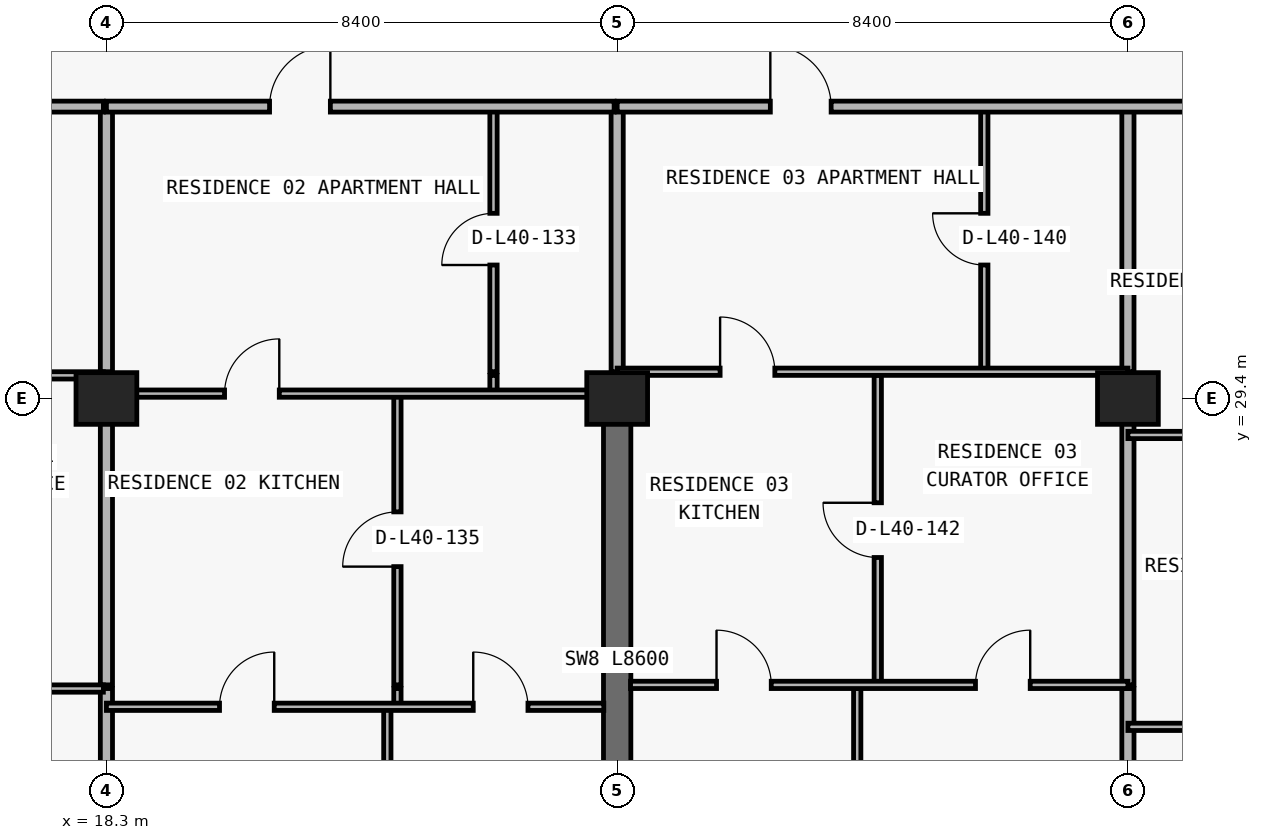
"""IFC4 building model, lengths in metres.
Left out: names, types, materials, properties, quantities, classifications, styles, units other than length and angle.
Written with IfcOpenShell. Run it as: python <this file> out.ifc"""

import sys

from ifc_helpers import new_model, si_unit, direction, frame, frame_2d, origin, origin_2d, place, context, subcontext, project, spatial, rectangle, extrude, element, fill, save


model = new_model("IFC4")
c1 = context("Model", 3, precision=1e-05, world=origin(), true_north=direction((0.0, 1.0)))
c2 = subcontext(c1, "Body", "Model", "MODEL_VIEW")
j1 = project(units=[si_unit("LENGTHUNIT", "METRE"), si_unit("PLANEANGLEUNIT", "RADIAN")], contexts=[c1])
p1 = place(None, origin())
s1 = spatial("IfcSite", under=j1, at=p1, CompositionType="ELEMENT")
p2 = place(p1, origin())
s2 = spatial("IfcBuilding", under=s1, at=p2, CompositionType="ELEMENT")
p3 = place(p2, frame((0.0, 0.0, 145.5)))
s3 = spatial("IfcBuildingStorey", under=s2, at=p3, CompositionType="ELEMENT", Elevation=145.5)
for number, where, z_axis, x_axis in (
    (1, (18.3, 29.4, 0.0), (0.0, 0.0, 1.0), (1.0, 0.0, 0.0)),
    (2, (26.7, 29.4, 0.0), (0.0, 0.0, 1.0), (1.0, 0.0, 0.0)),
    (3, (35.1, 29.4, 0.0), (0.0, 0.0, 1.0), (1.0, 0.0, 0.0)),
):
    element("IfcColumn", number, at=place(p3, frame(where, z_axis=z_axis, x_axis=x_axis)), inside=s3, PredefinedType="COLUMN", context=c2, shape_type="SweptSolid", body=[
        extrude(rectangle(XDim=1.0, YDim=0.85, at=origin_2d()), origin(), (0.0, 0.0, 1.0), 3.05),
    ])
p4 = place(p3, frame((26.7, 20.8, 0.0), z_axis=(0.0, 0.0, 1.0), x_axis=(0.0, 1.0, 0.0)))
e4 = element("IfcWall", 4, at=p4, inside=s3, PredefinedType="SHEAR", context=c2, shape_type="SweptSolid", body=[
    extrude(rectangle(XDim=8.6, YDim=0.45, at=frame_2d((4.3, 0.0))), origin(), (0.0, 0.0, 1.0), 3.05),
])
p5 = place(p3, frame((18.3, 8.84, 0.0), z_axis=(0.0, 0.0, 1.0), x_axis=(0.0, 1.0, 0.0)))
e5 = element("IfcWall", 5, at=p5, inside=s3, PredefinedType="PARTITIONING", context=c2, shape_type="SweptSolid", body=[
    extrude(rectangle(XDim=15.79, YDim=0.2, at=frame_2d((7.895, 0.0))), origin(), (0.0, 0.0, 1.0), 2.174),
])
p6 = place(p3, frame((18.3, 24.69, 0.0), z_axis=(0.0, 0.0, 1.0), x_axis=(0.0, 1.0, 0.0)))
e6 = element("IfcWall", 6, at=p6, inside=s3, PredefinedType="PARTITIONING", context=c2, shape_type="SweptSolid", body=[
    extrude(rectangle(XDim=5.09, YDim=0.2, at=frame_2d((2.545, 0.0))), origin(), (0.0, 0.0, 1.0), 2.174),
])
p7 = place(p3, frame((18.3, 29.84, 0.0), z_axis=(0.0, 0.0, 1.0), x_axis=(0.0, 1.0, 0.0)))
e7 = element("IfcWall", 7, at=p7, inside=s3, PredefinedType="PARTITIONING", context=c2, shape_type="SweptSolid", body=[
    extrude(rectangle(XDim=4.36, YDim=0.2, at=frame_2d((2.18, 0.0))), origin(), (0.0, 0.0, 1.0), 2.174),
])
p8 = place(p3, frame((22.92, 8.84, 0.0), z_axis=(0.0, 0.0, 1.0), x_axis=(0.0, 1.0, 0.0)))
e8 = element("IfcWall", 8, at=p8, inside=s3, PredefinedType="PARTITIONING", context=c2, shape_type="SweptSolid", body=[
    extrude(rectangle(XDim=15.49, YDim=0.12, at=frame_2d((7.745, 0.0))), origin(), (0.0, 0.0, 1.0), 3.05),
])
p9 = place(p3, frame((23.086, 24.335, 0.0), z_axis=(0.0, 0.0, 1.0), x_axis=(0.0, 1.0, 0.0)))
e9 = element("IfcWall", 9, at=p9, inside=s3, PredefinedType="PARTITIONING", context=c2, shape_type="SweptSolid", body=[
    extrude(rectangle(XDim=0.295, YDim=0.12, at=frame_2d((0.147, 0.0))), origin(), (0.0, 0.0, 1.0), 3.05),
])
p10 = place(p3, frame((23.086, 24.69, 0.0), z_axis=(0.0, 0.0, 1.0), x_axis=(0.0, 1.0, 0.0)))
e10 = element("IfcWall", 10, at=p10, inside=s3, PredefinedType="PARTITIONING", context=c2, shape_type="SweptSolid", body=[
    extrude(rectangle(XDim=4.79, YDim=0.12, at=frame_2d((2.395, 0.0))), origin(), (0.0, 0.0, 1.0), 3.05),
])
p11 = place(p10, frame((1.945, 0.0, 0.0)))
e11 = element("IfcOpeningElement", 11, at=p11, cuts=e10, PredefinedType="OPENING", context=c2, shape_type="SweptSolid", body=[
    extrude(rectangle(XDim=0.9, YDim=2.15, at=frame_2d((0.45, 1.075))), frame((0.0, 0.07, 0.0), z_axis=(0.0, -1.0, 0.0), x_axis=(1.0, 0.0, 0.0)), (0.0, 0.0, 1.0), 0.14),
])
p12 = place(p3, frame((24.666, 29.48, 0.0), z_axis=(0.0, 0.0, 1.0), x_axis=(0.0, 1.0, 0.0)))
e12 = element("IfcWall", 12, at=p12, inside=s3, PredefinedType="PARTITIONING", context=c2, shape_type="SweptSolid", body=[
    extrude(rectangle(XDim=0.3, YDim=0.12, at=frame_2d((0.15, 0.0))), origin(), (0.0, 0.0, 1.0), 3.05),
])
p13 = place(p3, frame((24.666, 29.84, 0.0), z_axis=(0.0, 0.0, 1.0), x_axis=(0.0, 1.0, 0.0)))
e13 = element("IfcWall", 13, at=p13, inside=s3, PredefinedType="PARTITIONING", context=c2, shape_type="SweptSolid", body=[
    extrude(rectangle(XDim=4.36, YDim=0.12, at=frame_2d((2.18, 0.0))), origin(), (0.0, 0.0, 1.0), 3.05),
])
p14 = place(p13, frame((1.755, 0.0, 0.0)))
e14 = element("IfcOpeningElement", 14, at=p14, cuts=e13, PredefinedType="OPENING", context=c2, shape_type="SweptSolid", body=[
    extrude(rectangle(XDim=0.85, YDim=2.1, at=frame_2d((0.425, 1.05))), frame((0.0, 0.07, 0.0), z_axis=(0.0, -1.0, 0.0), x_axis=(1.0, 0.0, 0.0)), (0.0, 0.0, 1.0), 0.14),
])
p15 = place(p3, frame((26.7, 29.405, 0.0), z_axis=(0.0, 0.0, 1.0), x_axis=(0.0, 1.0, 0.0)))
e15 = element("IfcWall", 15, at=p15, inside=s3, PredefinedType="PARTITIONING", context=c2, shape_type="SweptSolid", body=[
    extrude(rectangle(XDim=0.375, YDim=0.2, at=frame_2d((0.188, 0.0))), origin(), (0.0, 0.0, 1.0), 3.05),
])
p16 = place(p3, frame((26.7, 29.84, 0.0), z_axis=(0.0, 0.0, 1.0), x_axis=(0.0, 1.0, 0.0)))
e16 = element("IfcWall", 16, at=p16, inside=s3, PredefinedType="PARTITIONING", context=c2, shape_type="SweptSolid", body=[
    extrude(rectangle(XDim=4.36, YDim=0.2, at=frame_2d((2.18, 0.0))), origin(), (0.0, 0.0, 1.0), 2.335),
])
p17 = place(p3, frame((30.648, 8.84, 0.0), z_axis=(0.0, 0.0, 1.0), x_axis=(0.0, 1.0, 0.0)))
e17 = element("IfcWall", 17, at=p17, inside=s3, PredefinedType="PARTITIONING", context=c2, shape_type="SweptSolid", body=[
    extrude(rectangle(XDim=15.79, YDim=0.12, at=frame_2d((7.895, 0.0))), origin(), (0.0, 0.0, 1.0), 3.05),
])
p18 = place(p3, frame((30.986, 24.69, 0.0), z_axis=(0.0, 0.0, 1.0), x_axis=(0.0, 1.0, 0.0)))
e18 = element("IfcWall", 18, at=p18, inside=s3, PredefinedType="PARTITIONING", context=c2, shape_type="SweptSolid", body=[
    extrude(rectangle(XDim=5.09, YDim=0.12, at=frame_2d((2.545, 0.0))), origin(), (0.0, 0.0, 1.0), 2.725),
])
p19 = place(p18, frame((2.095, 0.0, 0.0)))
e19 = element("IfcOpeningElement", 19, at=p19, cuts=e18, PredefinedType="OPENING", context=c2, shape_type="SweptSolid", body=[
    extrude(rectangle(XDim=0.9, YDim=2.15, at=frame_2d((0.45, 1.075))), frame((0.0, 0.07, 0.0), z_axis=(0.0, -1.0, 0.0), x_axis=(1.0, 0.0, 0.0)), (0.0, 0.0, 1.0), 0.14),
])
p20 = place(p3, frame((32.738, 29.84, 0.0), z_axis=(0.0, 0.0, 1.0), x_axis=(0.0, 1.0, 0.0)))
e20 = element("IfcWall", 20, at=p20, inside=s3, PredefinedType="PARTITIONING", context=c2, shape_type="SweptSolid", body=[
    extrude(rectangle(XDim=4.36, YDim=0.12, at=frame_2d((2.18, 0.0))), origin(), (0.0, 0.0, 1.0), 3.05),
])
p21 = place(p20, frame((1.755, 0.0, 0.0)))
e21 = element("IfcOpeningElement", 21, at=p21, cuts=e20, PredefinedType="OPENING", context=c2, shape_type="SweptSolid", body=[
    extrude(rectangle(XDim=0.85, YDim=2.1, at=frame_2d((0.425, 1.05))), frame((0.0, 0.07, 0.0), z_axis=(0.0, -1.0, 0.0), x_axis=(1.0, 0.0, 0.0)), (0.0, 0.0, 1.0), 0.14),
])
p22 = place(p3, frame((35.1, 8.84, 0.0), z_axis=(0.0, 0.0, 1.0), x_axis=(0.0, 1.0, 0.0)))
e22 = element("IfcWall", 22, at=p22, inside=s3, PredefinedType="PARTITIONING", context=c2, shape_type="SweptSolid", body=[
    extrude(rectangle(XDim=15.79, YDim=0.2, at=frame_2d((7.895, 0.0))), origin(), (0.0, 0.0, 1.0), 2.174),
])
p23 = place(p3, frame((35.1, 24.69, 0.0), z_axis=(0.0, 0.0, 1.0), x_axis=(0.0, 1.0, 0.0)))
e23 = element("IfcWall", 23, at=p23, inside=s3, PredefinedType="PARTITIONING", context=c2, shape_type="SweptSolid", body=[
    extrude(rectangle(XDim=5.09, YDim=0.2, at=frame_2d((2.545, 0.0))), origin(), (0.0, 0.0, 1.0), 2.174),
])
p24 = place(p3, frame((35.1, 29.84, 0.0), z_axis=(0.0, 0.0, 1.0), x_axis=(0.0, 1.0, 0.0)))
e24 = element("IfcWall", 24, at=p24, inside=s3, PredefinedType="PARTITIONING", context=c2, shape_type="SweptSolid", body=[
    extrude(rectangle(XDim=4.36, YDim=0.2, at=frame_2d((2.18, 0.0))), origin(), (0.0, 0.0, 1.0), 2.174),
])
p25 = place(p3, frame((35.1, 24.0, 0.0), z_axis=(0.0, 0.0, 1.0), x_axis=(1.0, 0.0, 0.0)))
e25 = element("IfcWall", 25, at=p25, inside=s3, PredefinedType="PARTITIONING", context=c2, shape_type="SweptSolid", body=[
    extrude(rectangle(XDim=7.6, YDim=0.12, at=frame_2d((3.8, 0.0))), origin(), (0.0, 0.0, 1.0), 3.05),
])
p26 = place(p25, frame((3.35, 0.0, 0.0)))
e26 = element("IfcOpeningElement", 26, at=p26, cuts=e25, PredefinedType="OPENING", context=c2, shape_type="SweptSolid", body=[
    extrude(rectangle(XDim=0.9, YDim=2.15, at=frame_2d((0.45, 1.075))), frame((0.0, 0.07, 0.0), z_axis=(0.0, -1.0, 0.0), x_axis=(1.0, 0.0, 0.0)), (0.0, 0.0, 1.0), 0.14),
])
p27 = place(p3, frame((18.3, 24.33, 0.0), z_axis=(0.0, 0.0, 1.0), x_axis=(1.0, 0.0, 0.0)))
e27 = element("IfcWall", 27, at=p27, inside=s3, PredefinedType="PARTITIONING", context=c2, shape_type="SweptSolid", body=[
    extrude(rectangle(XDim=8.18, YDim=0.12, at=frame_2d((4.09, 0.0))), origin(), (0.0, 0.0, 1.0), 3.05),
])
p28 = place(p27, frame((1.86, 0.0, 0.0)))
e28 = element("IfcOpeningElement", 28, at=p28, cuts=e27, PredefinedType="OPENING", context=c2, shape_type="SweptSolid", body=[
    extrude(rectangle(XDim=0.9, YDim=2.15, at=frame_2d((0.45, 1.075))), frame((0.0, 0.07, 0.0), z_axis=(0.0, -1.0, 0.0), x_axis=(1.0, 0.0, 0.0)), (0.0, 0.0, 1.0), 0.14),
])
p29 = place(p27, frame((6.033, 0.0, 0.0)))
e29 = element("IfcOpeningElement", 29, at=p29, cuts=e27, PredefinedType="OPENING", context=c2, shape_type="SweptSolid", body=[
    extrude(rectangle(XDim=0.9, YDim=2.15, at=frame_2d((0.45, 1.075))), frame((0.0, 0.07, 0.0), z_axis=(0.0, -1.0, 0.0), x_axis=(1.0, 0.0, 0.0)), (0.0, 0.0, 1.0), 0.14),
])
p30 = place(p3, frame((9.9, 24.63, 0.0), z_axis=(0.0, 0.0, 1.0), x_axis=(1.0, 0.0, 0.0)))
e30 = element("IfcWall", 30, at=p30, inside=s3, PredefinedType="PARTITIONING", context=c2, shape_type="SweptSolid", body=[
    extrude(rectangle(XDim=8.35, YDim=0.12, at=frame_2d((4.175, 0.0))), origin(), (0.0, 0.0, 1.0), 3.05),
])
p31 = place(p30, frame((1.524, 0.0, 0.0)))
e31 = element("IfcOpeningElement", 31, at=p31, cuts=e30, PredefinedType="OPENING", context=c2, shape_type="SweptSolid", body=[
    extrude(rectangle(XDim=0.9, YDim=2.15, at=frame_2d((0.45, 1.075))), frame((0.0, 0.07, 0.0), z_axis=(0.0, -1.0, 0.0), x_axis=(1.0, 0.0, 0.0)), (0.0, 0.0, 1.0), 0.14),
])
p32 = place(p30, frame((5.993, 0.0, 0.0)))
e32 = element("IfcOpeningElement", 32, at=p32, cuts=e30, PredefinedType="OPENING", context=c2, shape_type="SweptSolid", body=[
    extrude(rectangle(XDim=0.9, YDim=2.15, at=frame_2d((0.45, 1.075))), frame((0.0, 0.07, 0.0), z_axis=(0.0, -1.0, 0.0), x_axis=(1.0, 0.0, 0.0)), (0.0, 0.0, 1.0), 0.14),
])
p33 = place(p3, frame((26.92, 24.69, 0.0), z_axis=(0.0, 0.0, 1.0), x_axis=(1.0, 0.0, 0.0)))
e33 = element("IfcWall", 33, at=p33, inside=s3, PredefinedType="PARTITIONING", context=c2, shape_type="SweptSolid", body=[
    extrude(rectangle(XDim=8.18, YDim=0.12, at=frame_2d((4.09, 0.0))), origin(), (0.0, 0.0, 1.0), 3.05),
])
p34 = place(p33, frame((1.414, 0.0, 0.0)))
e34 = element("IfcOpeningElement", 34, at=p34, cuts=e33, PredefinedType="OPENING", context=c2, shape_type="SweptSolid", body=[
    extrude(rectangle(XDim=0.9, YDim=2.15, at=frame_2d((0.45, 1.075))), frame((0.0, 0.07, 0.0), z_axis=(0.0, -1.0, 0.0), x_axis=(1.0, 0.0, 0.0)), (0.0, 0.0, 1.0), 0.14),
])
p35 = place(p33, frame((5.673, 0.0, 0.0)))
e35 = element("IfcOpeningElement", 35, at=p35, cuts=e33, PredefinedType="OPENING", context=c2, shape_type="SweptSolid", body=[
    extrude(rectangle(XDim=0.9, YDim=2.15, at=frame_2d((0.45, 1.075))), frame((0.0, 0.07, 0.0), z_axis=(0.0, -1.0, 0.0), x_axis=(1.0, 0.0, 0.0)), (0.0, 0.0, 1.0), 0.14),
])
p36 = place(p3, frame((35.1, 28.8, 0.0), z_axis=(0.0, 0.0, 1.0), x_axis=(1.0, 0.0, 0.0)))
e36 = element("IfcWall", 36, at=p36, inside=s3, PredefinedType="PARTITIONING", context=c2, shape_type="SweptSolid", body=[
    extrude(rectangle(XDim=7.595, YDim=0.12, at=frame_2d((3.797, 0.0))), origin(), (0.0, 0.0, 1.0), 3.05),
])
p37 = place(p36, frame((2.442, 0.0, 0.0)))
e37 = element("IfcOpeningElement", 37, at=p37, cuts=e36, PredefinedType="OPENING", context=c2, shape_type="SweptSolid", body=[
    extrude(rectangle(XDim=0.9, YDim=2.15, at=frame_2d((0.45, 1.075))), frame((0.0, 0.07, 0.0), z_axis=(0.0, -1.0, 0.0), x_axis=(1.0, 0.0, 0.0)), (0.0, 0.0, 1.0), 0.14),
])
p38 = place(p3, frame((18.3, 29.48, 0.0), z_axis=(0.0, 0.0, 1.0), x_axis=(1.0, 0.0, 0.0)))
e38 = element("IfcWall", 38, at=p38, inside=s3, PredefinedType="PARTITIONING", context=c2, shape_type="SweptSolid", body=[
    extrude(rectangle(XDim=8.18, YDim=0.12, at=frame_2d((4.09, 0.0))), origin(), (0.0, 0.0, 1.0), 2.174),
])
p39 = place(p38, frame((1.943, 0.0, 0.0)))
e39 = element("IfcOpeningElement", 39, at=p39, cuts=e38, PredefinedType="OPENING", context=c2, shape_type="SweptSolid", body=[
    extrude(rectangle(XDim=0.9, YDim=2.124, at=frame_2d((0.45, 1.062))), frame((0.0, 0.07, 0.0), z_axis=(0.0, -1.0, 0.0), x_axis=(1.0, 0.0, 0.0)), (0.0, 0.0, 1.0), 0.14),
])
p40 = place(p3, frame((9.9, 29.78, 0.0), z_axis=(0.0, 0.0, 1.0), x_axis=(1.0, 0.0, 0.0)))
e40 = element("IfcWall", 40, at=p40, inside=s3, PredefinedType="PARTITIONING", context=c2, shape_type="SweptSolid", body=[
    extrude(rectangle(XDim=8.35, YDim=0.12, at=frame_2d((4.175, 0.0))), origin(), (0.0, 0.0, 1.0), 3.05),
])
p41 = place(p40, frame((1.818, 0.0, 0.0)))
e41 = element("IfcOpeningElement", 41, at=p41, cuts=e40, PredefinedType="OPENING", context=c2, shape_type="SweptSolid", body=[
    extrude(rectangle(XDim=0.9, YDim=2.15, at=frame_2d((0.45, 1.075))), frame((0.0, 0.07, 0.0), z_axis=(0.0, -1.0, 0.0), x_axis=(1.0, 0.0, 0.0)), (0.0, 0.0, 1.0), 0.14),
])
p42 = place(p3, frame((26.7, 29.84, 0.0), z_axis=(0.0, 0.0, 1.0), x_axis=(1.0, 0.0, 0.0)))
e42 = element("IfcWall", 42, at=p42, inside=s3, PredefinedType="PARTITIONING", context=c2, shape_type="SweptSolid", body=[
    extrude(rectangle(XDim=8.4, YDim=0.12, at=frame_2d((4.2, 0.0))), origin(), (0.0, 0.0, 1.0), 3.05),
])
p43 = place(p42, frame((1.693, 0.0, 0.0)))
e43 = element("IfcOpeningElement", 43, at=p43, cuts=e42, PredefinedType="OPENING", context=c2, shape_type="SweptSolid", body=[
    extrude(rectangle(XDim=0.9, YDim=2.15, at=frame_2d((0.45, 1.075))), frame((0.0, 0.07, 0.0), z_axis=(0.0, -1.0, 0.0), x_axis=(1.0, 0.0, 0.0)), (0.0, 0.0, 1.0), 0.14),
])
p44 = place(p3, frame((7.705, 34.2, 0.0), z_axis=(0.0, 0.0, 1.0), x_axis=(1.0, 0.0, 0.0)))
e44 = element("IfcWall", 44, at=p44, inside=s3, PredefinedType="PARTITIONING", context=c2, shape_type="SweptSolid", body=[
    extrude(rectangle(XDim=10.545, YDim=0.18, at=frame_2d((5.272, 0.0))), origin(), (0.0, 0.0, 1.0), 3.05),
])
p45 = place(p44, frame((4.73, 0.0, 0.0)))
e45 = element("IfcOpeningElement", 45, at=p45, cuts=e44, PredefinedType="OPENING", context=c2, shape_type="SweptSolid", body=[
    extrude(rectangle(XDim=1.0, YDim=2.2, at=frame_2d((0.5, 1.1))), frame((0.0, 0.1, 0.0), z_axis=(0.0, -1.0, 0.0), x_axis=(1.0, 0.0, 0.0)), (0.0, 0.0, 1.0), 0.2),
])
p46 = place(p3, frame((18.3, 34.2, 0.0), z_axis=(0.0, 0.0, 1.0), x_axis=(1.0, 0.0, 0.0)))
e46 = element("IfcWall", 46, at=p46, inside=s3, PredefinedType="PARTITIONING", context=c2, shape_type="SweptSolid", body=[
    extrude(rectangle(XDim=8.35, YDim=0.18, at=frame_2d((4.175, 0.0))), origin(), (0.0, 0.0, 1.0), 3.05),
])
p47 = place(p46, frame((2.683, 0.0, 0.0)))
e47 = element("IfcOpeningElement", 47, at=p47, cuts=e46, PredefinedType="OPENING", context=c2, shape_type="SweptSolid", body=[
    extrude(rectangle(XDim=1.0, YDim=2.2, at=frame_2d((0.5, 1.1))), frame((0.0, 0.1, 0.0), z_axis=(0.0, -1.0, 0.0), x_axis=(1.0, 0.0, 0.0)), (0.0, 0.0, 1.0), 0.2),
])
p48 = place(p3, frame((26.7, 34.2, 0.0), z_axis=(0.0, 0.0, 1.0), x_axis=(1.0, 0.0, 0.0)))
e48 = element("IfcWall", 48, at=p48, inside=s3, PredefinedType="PARTITIONING", context=c2, shape_type="SweptSolid", body=[
    extrude(rectangle(XDim=32.8, YDim=0.18, at=frame_2d((16.4, 0.0))), origin(), (0.0, 0.0, 1.0), 3.05),
])
p49 = place(p48, frame((2.519, 0.0, 0.0)))
e49 = element("IfcOpeningElement", 49, at=p49, cuts=e48, PredefinedType="OPENING", context=c2, shape_type="SweptSolid", body=[
    extrude(rectangle(XDim=1.0, YDim=2.2, at=frame_2d((0.5, 1.1))), frame((0.0, 0.1, 0.0), z_axis=(0.0, -1.0, 0.0), x_axis=(1.0, 0.0, 0.0)), (0.0, 0.0, 1.0), 0.2),
])
p50 = place(p48, frame((10.792, 0.0, 0.0)))
e50 = element("IfcOpeningElement", 50, at=p50, cuts=e48, PredefinedType="OPENING", context=c2, shape_type="SweptSolid", body=[
    extrude(rectangle(XDim=1.0, YDim=2.2, at=frame_2d((0.5, 1.1))), frame((0.0, 0.1, 0.0), z_axis=(0.0, -1.0, 0.0), x_axis=(1.0, 0.0, 0.0)), (0.0, 0.0, 1.0), 0.2),
])
p51 = place(p48, frame((27.146, 0.0, 0.0)))
e51 = element("IfcOpeningElement", 51, at=p51, cuts=e48, PredefinedType="OPENING", context=c2, shape_type="SweptSolid", body=[
    extrude(rectangle(XDim=1.0, YDim=2.2, at=frame_2d((0.5, 1.1))), frame((0.0, 0.1, 0.0), z_axis=(0.0, -1.0, 0.0), x_axis=(1.0, 0.0, 0.0)), (0.0, 0.0, 1.0), 0.2),
])
p52 = place(p47, origin())
e52 = element("IfcDoor", 52, at=p52, inside=s3, OperationType="SINGLE_SWING_RIGHT", PredefinedType="DOOR", context=c2, shape_type="SweptSolid", body=[
    extrude(rectangle(XDim=1.0, YDim=2.2, at=frame_2d((0.5, 1.1))), frame((0.0, 0.025, 0.0), z_axis=(0.0, -1.0, 0.0), x_axis=(1.0, 0.0, 0.0)), (0.0, 0.0, 1.0), 0.05),
])
fill(e47, e52)
p53 = place(p14, origin())
e53 = element("IfcDoor", 53, at=p53, inside=s3, OperationType="SINGLE_SWING_LEFT", PredefinedType="DOOR", context=c2, shape_type="SweptSolid", body=[
    extrude(rectangle(XDim=0.85, YDim=2.1, at=frame_2d((0.425, 1.05))), frame((0.0, 0.025, 0.0), z_axis=(0.0, -1.0, 0.0), x_axis=(1.0, 0.0, 0.0)), (0.0, 0.0, 1.0), 0.05),
])
fill(e14, e53)
p54 = place(p39, origin())
e54 = element("IfcDoor", 54, at=p54, inside=s3, OperationType="SINGLE_SWING_RIGHT", PredefinedType="DOOR", context=c2, shape_type="SweptSolid", body=[
    extrude(rectangle(XDim=0.9, YDim=2.124, at=frame_2d((0.45, 1.062))), frame((0.0, 0.025, 0.0), z_axis=(0.0, -1.0, 0.0), x_axis=(1.0, 0.0, 0.0)), (0.0, 0.0, 1.0), 0.05),
])
fill(e39, e54)
p55 = place(p11, origin())
e55 = element("IfcDoor", 55, at=p55, inside=s3, OperationType="SINGLE_SWING_LEFT", PredefinedType="DOOR", context=c2, shape_type="SweptSolid", body=[
    extrude(rectangle(XDim=0.9, YDim=2.15, at=frame_2d((0.45, 1.075))), frame((0.0, 0.025, 0.0), z_axis=(0.0, -1.0, 0.0), x_axis=(1.0, 0.0, 0.0)), (0.0, 0.0, 1.0), 0.05),
])
fill(e11, e55)
p56 = place(p28, origin())
e56 = element("IfcDoor", 56, at=p56, inside=s3, OperationType="SINGLE_SWING_RIGHT", PredefinedType="DOOR", context=c2, shape_type="SweptSolid", body=[
    extrude(rectangle(XDim=0.9, YDim=2.15, at=frame_2d((0.45, 1.075))), frame((0.0, 0.025, 0.0), z_axis=(0.0, -1.0, 0.0), x_axis=(1.0, 0.0, 0.0)), (0.0, 0.0, 1.0), 0.05),
])
fill(e28, e56)
p57 = place(p29, origin())
e57 = element("IfcDoor", 57, at=p57, inside=s3, OperationType="SINGLE_SWING_LEFT", PredefinedType="DOOR", context=c2, shape_type="SweptSolid", body=[
    extrude(rectangle(XDim=0.9, YDim=2.15, at=frame_2d((0.45, 1.075))), frame((0.0, 0.025, 0.0), z_axis=(0.0, -1.0, 0.0), x_axis=(1.0, 0.0, 0.0)), (0.0, 0.0, 1.0), 0.05),
])
fill(e29, e57)
p58 = place(p49, origin())
e58 = element("IfcDoor", 58, at=p58, inside=s3, OperationType="SINGLE_SWING_LEFT", PredefinedType="DOOR", context=c2, shape_type="SweptSolid", body=[
    extrude(rectangle(XDim=1.0, YDim=2.2, at=frame_2d((0.5, 1.1))), frame((0.0, 0.025, 0.0), z_axis=(0.0, -1.0, 0.0), x_axis=(1.0, 0.0, 0.0)), (0.0, 0.0, 1.0), 0.05),
])
fill(e49, e58)
p59 = place(p21, origin())
e59 = element("IfcDoor", 59, at=p59, inside=s3, OperationType="SINGLE_SWING_RIGHT", PredefinedType="DOOR", context=c2, shape_type="SweptSolid", body=[
    extrude(rectangle(XDim=0.85, YDim=2.1, at=frame_2d((0.425, 1.05))), frame((0.0, 0.025, 0.0), z_axis=(0.0, -1.0, 0.0), x_axis=(1.0, 0.0, 0.0)), (0.0, 0.0, 1.0), 0.05),
])
fill(e21, e59)
p60 = place(p43, origin())
e60 = element("IfcDoor", 60, at=p60, inside=s3, OperationType="SINGLE_SWING_LEFT", PredefinedType="DOOR", context=c2, shape_type="SweptSolid", body=[
    extrude(rectangle(XDim=0.9, YDim=2.15, at=frame_2d((0.45, 1.075))), frame((0.0, 0.025, 0.0), z_axis=(0.0, -1.0, 0.0), x_axis=(1.0, 0.0, 0.0)), (0.0, 0.0, 1.0), 0.05),
])
fill(e43, e60)
p61 = place(p19, origin())
e61 = element("IfcDoor", 61, at=p61, inside=s3, OperationType="SINGLE_SWING_RIGHT", PredefinedType="DOOR", context=c2, shape_type="SweptSolid", body=[
    extrude(rectangle(XDim=0.9, YDim=2.15, at=frame_2d((0.45, 1.075))), frame((0.0, 0.025, 0.0), z_axis=(0.0, -1.0, 0.0), x_axis=(1.0, 0.0, 0.0)), (0.0, 0.0, 1.0), 0.05),
])
fill(e19, e61)
p62 = place(p34, origin())
e62 = element("IfcDoor", 62, at=p62, inside=s3, OperationType="SINGLE_SWING_LEFT", PredefinedType="DOOR", context=c2, shape_type="SweptSolid", body=[
    extrude(rectangle(XDim=0.9, YDim=2.15, at=frame_2d((0.45, 1.075))), frame((0.0, 0.025, 0.0), z_axis=(0.0, -1.0, 0.0), x_axis=(1.0, 0.0, 0.0)), (0.0, 0.0, 1.0), 0.05),
])
fill(e34, e62)
p63 = place(p35, origin())
e63 = element("IfcDoor", 63, at=p63, inside=s3, OperationType="SINGLE_SWING_RIGHT", PredefinedType="DOOR", context=c2, shape_type="SweptSolid", body=[
    extrude(rectangle(XDim=0.9, YDim=2.15, at=frame_2d((0.45, 1.075))), frame((0.0, 0.025, 0.0), z_axis=(0.0, -1.0, 0.0), x_axis=(1.0, 0.0, 0.0)), (0.0, 0.0, 1.0), 0.05),
])
fill(e35, e63)
save(model, sys.argv[1])
